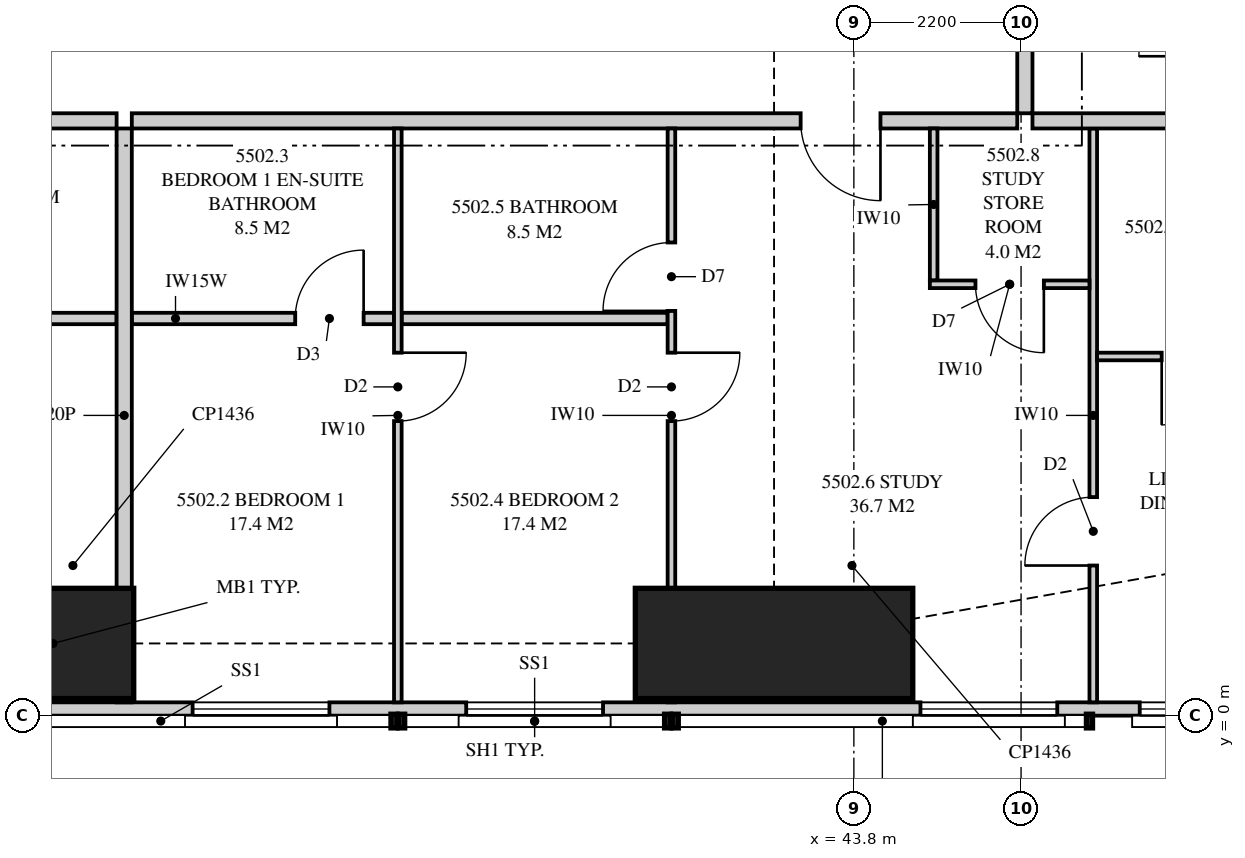
"""IFC4 building model, lengths in metres.
Left out: names, types, materials, properties, quantities, classifications, styles, units other than length and angle.
Written with IfcOpenShell. Run it as: python <this file> out.ifc"""

import sys

from ifc_helpers import new_model, si_unit, direction, frame, frame_2d, origin, origin_2d, place, context, subcontext, project, spatial, polyline, rectangle, outline, extrude, element, fill, save


model = new_model("IFC4")
c1 = context("Model", 3, precision=1e-05, world=origin(), true_north=direction((0.0, 1.0)))
c2 = subcontext(c1, "Body", "Model", "MODEL_VIEW")
j1 = project(units=[si_unit("LENGTHUNIT", "METRE"), si_unit("PLANEANGLEUNIT", "RADIAN")], contexts=[c1])
p1 = place(None, origin())
s1 = spatial("IfcSite", under=j1, at=p1, CompositionType="ELEMENT")
p2 = place(p1, origin())
s2 = spatial("IfcBuilding", under=s1, at=p2, CompositionType="ELEMENT")
p3 = place(p2, frame((0.0, 0.0, 201.25)))
s3 = spatial("IfcBuildingStorey", under=s2, at=p3, CompositionType="ELEMENT", Elevation=201.25)
for number, where, z_axis, x_axis in (
    (1, (32.5, 0.95, 0.0), (0.0, 0.0, 1.0), (0.0, 1.0, 0.0)),
    (2, (42.75, 0.95, 0.0), (0.0, 0.0, 1.0), (0.0, 1.0, 0.0)),
):
    element("IfcColumn", number, at=place(p3, frame(where, z_axis=z_axis, x_axis=x_axis)), inside=s3, PredefinedType="COLUMN", context=c2, shape_type="SweptSolid", body=[
        extrude(rectangle(XDim=1.45, YDim=3.65, at=origin_2d()), origin(), (0.0, 0.0, 1.0), 3.35),
    ])
p4 = place(p3, frame((15.051, 0.087, 0.0), z_axis=(0.0, 0.0, 1.0), x_axis=(1.0, 0.0, 0.0)))
e3 = element("IfcWall", 3, at=p4, inside=s3, PredefinedType="SOLIDWALL", context=c2, shape_type="SweptSolid", body=[
    extrude(outline(polyline([(0.0, 0.0), (34.897, 0.0), (34.897, 3.11), (27.91, 3.11), (27.91, 2.15), (27.836, 2.15), (27.836, 3.11), (27.699, 3.11), (27.699, 2.15), (7.199, 2.15), (7.199, 3.11), (7.062, 3.11), (7.062, 2.15), (6.987, 2.15), (6.987, 3.11), (0.0, 3.11), (0.0, 0.0)])), frame((0.0, 0.087, 0.0), z_axis=(0.0, -1.0, 0.0), x_axis=(1.0, 0.0, 0.0)), (0.0, 0.0, 1.0), 0.175),
])
p5 = place(p4, frame((0.699, 0.0, 0.4)))
e4 = element("IfcOpeningElement", 4, at=p5, cuts=e3, PredefinedType="OPENING", context=c2, shape_type="SweptSolid", body=[
    extrude(rectangle(XDim=1.8, YDim=1.7, at=frame_2d((0.9, 0.85))), frame((0.0, 0.097, 0.0), z_axis=(0.0, -1.0, 0.0), x_axis=(1.0, 0.0, 0.0)), (0.0, 0.0, 1.0), 0.195),
])
p6 = place(p4, frame((9.274, 0.0, 0.4)))
e5 = element("IfcOpeningElement", 5, at=p6, cuts=e3, PredefinedType="OPENING", context=c2, shape_type="SweptSolid", body=[
    extrude(rectangle(XDim=2.4, YDim=1.7, at=frame_2d((1.2, 0.85))), frame((0.0, 0.097, 0.0), z_axis=(0.0, -1.0, 0.0), x_axis=(1.0, 0.0, 0.0)), (0.0, 0.0, 1.0), 0.195),
])
p7 = place(p4, frame((13.561, 0.0, 0.0)))
e6 = element("IfcOpeningElement", 6, at=p7, cuts=e3, PredefinedType="OPENING", context=c2, shape_type="SweptSolid", body=[
    extrude(rectangle(XDim=1.8, YDim=2.1, at=frame_2d((0.9, 1.05))), frame((0.0, 0.097, 0.0), z_axis=(0.0, -1.0, 0.0), x_axis=(1.0, 0.0, 0.0)), (0.0, 0.0, 1.0), 0.195),
])
p8 = place(p4, frame((20.049, 0.0, 0.4)))
e7 = element("IfcOpeningElement", 7, at=p8, cuts=e3, PredefinedType="OPENING", context=c2, shape_type="SweptSolid", body=[
    extrude(rectangle(XDim=1.8, YDim=1.7, at=frame_2d((0.9, 0.85))), frame((0.0, 0.097, 0.0), z_axis=(0.0, -1.0, 0.0), x_axis=(1.0, 0.0, 0.0)), (0.0, 0.0, 1.0), 0.195),
])
p9 = place(p4, frame((23.649, 0.0, 0.4)))
e8 = element("IfcOpeningElement", 8, at=p9, cuts=e3, PredefinedType="OPENING", context=c2, shape_type="SweptSolid", body=[
    extrude(rectangle(XDim=1.8, YDim=1.7, at=frame_2d((0.9, 0.85))), frame((0.0, 0.097, 0.0), z_axis=(0.0, -1.0, 0.0), x_axis=(1.0, 0.0, 0.0)), (0.0, 0.0, 1.0), 0.195),
])
p10 = place(p4, frame((29.625, 0.0, 0.4)))
e9 = element("IfcOpeningElement", 9, at=p10, cuts=e3, PredefinedType="OPENING", context=c2, shape_type="SweptSolid", body=[
    extrude(rectangle(XDim=1.8, YDim=1.7, at=frame_2d((0.9, 0.85))), frame((0.0, 0.097, 0.0), z_axis=(0.0, -1.0, 0.0), x_axis=(1.0, 0.0, 0.0)), (0.0, 0.0, 1.0), 0.195),
])
p11 = place(p4, frame((32.51, 0.0, 0.4)))
e10 = element("IfcOpeningElement", 10, at=p11, cuts=e3, PredefinedType="OPENING", context=c2, shape_type="SweptSolid", body=[
    extrude(rectangle(XDim=1.8, YDim=1.7, at=frame_2d((0.9, 0.85))), frame((0.0, 0.097, 0.0), z_axis=(0.0, -1.0, 0.0), x_axis=(1.0, 0.0, 0.0)), (0.0, 0.0, 1.0), 0.195),
])
p12 = place(p3, frame((34.2, 0.175, 0.0), z_axis=(0.0, 0.0, 1.0), x_axis=(0.0, 1.0, 0.0)))
e11 = element("IfcWall", 11, at=p12, inside=s3, PredefinedType="PARTITIONING", context=c2, shape_type="SweptSolid", body=[
    extrude(outline(polyline([(0.0, 0.0), (7.55, 0.0), (7.55, 3.11), (1.685, 3.11), (1.685, 2.15), (0.0, 2.15), (0.0, 3.11), (0.0, 0.0)])), frame((0.0, 0.1, 0.0), z_axis=(0.0, -1.0, 0.0), x_axis=(1.0, 0.0, 0.0)), (0.0, 0.0, 1.0), 0.2),
])
p13 = place(p3, frame((28.4, 5.225, 0.0), z_axis=(0.0, 0.0, 1.0), x_axis=(1.0, 0.0, 0.0)))
e12 = element("IfcWall", 12, at=p13, inside=s3, PredefinedType="PLUMBINGWALL", context=c2, shape_type="SweptSolid", body=[
    extrude(outline(polyline([(0.0, 0.0), (5.7, 0.0), (5.7, 3.11), (4.412, 3.11), (4.412, 2.541), (3.788, 2.541), (3.788, 3.11), (0.0, 3.11), (0.0, 0.0)])), frame((0.0, 0.075, 0.0), z_axis=(0.0, -1.0, 0.0), x_axis=(1.0, 0.0, 0.0)), (0.0, 0.0, 1.0), 0.15),
])
p14 = place(p13, frame((0.4, 0.0, 0.0)))
e13 = element("IfcOpeningElement", 13, at=p14, cuts=e12, PredefinedType="OPENING", context=c2, shape_type="SweptSolid", body=[
    extrude(rectangle(XDim=0.9, YDim=2.1, at=frame_2d((0.45, 1.05))), frame((0.0, 0.085, 0.0), z_axis=(0.0, -1.0, 0.0), x_axis=(1.0, 0.0, 0.0)), (0.0, 0.0, 1.0), 0.17),
])
p15 = place(p3, frame((34.3, 7.825, 0.0), z_axis=(0.0, 0.0, 1.0), x_axis=(1.0, 0.0, 0.0)))
e14 = element("IfcWall", 14, at=p15, inside=s3, PredefinedType="PARTITIONING", context=c2, shape_type="SweptSolid", body=[
    extrude(outline(polyline([(0.0, 0.0), (11.65, 0.0), (11.65, 3.11), (8.787, 3.11), (8.787, 2.541), (8.113, 2.541), (8.113, 3.11), (0.0, 3.11), (0.0, 0.0)])), frame((0.0, 0.1, 0.0), z_axis=(0.0, -1.0, 0.0), x_axis=(1.0, 0.0, 0.0)), (0.0, 0.0, 1.0), 0.2),
])
p16 = place(p15, frame((8.8, 0.0, 0.0)))
e15 = element("IfcOpeningElement", 15, at=p16, cuts=e14, PredefinedType="OPENING", context=c2, shape_type="SweptSolid", body=[
    extrude(rectangle(XDim=1.05, YDim=2.2, at=frame_2d((0.525, 1.1))), frame((0.0, 0.11, 0.0), z_axis=(0.0, -1.0, 0.0), x_axis=(1.0, 0.0, 0.0)), (0.0, 0.0, 1.0), 0.22),
])
p17 = place(p3, frame((37.8, 0.175, 0.0), z_axis=(0.0, 0.0, 1.0), x_axis=(0.0, 1.0, 0.0)))
e16 = element("IfcWall", 16, at=p17, inside=s3, PredefinedType="PARTITIONING", context=c2, shape_type="SweptSolid", body=[
    extrude(outline(polyline([(0.0, 0.0), (7.55, 0.0), (7.55, 3.11), (1.635, 3.11), (1.635, 2.15), (0.0, 2.15), (0.0, 3.11), (0.0, 0.0)])), frame((0.0, 0.05, 0.0), z_axis=(0.0, -1.0, 0.0), x_axis=(1.0, 0.0, 0.0)), (0.0, 0.0, 1.0), 0.1),
])
p18 = place(p17, frame((3.7, 0.0, 0.0)))
e17 = element("IfcOpeningElement", 17, at=p18, cuts=e16, PredefinedType="OPENING", context=c2, shape_type="SweptSolid", body=[
    extrude(rectangle(XDim=0.9, YDim=2.1, at=frame_2d((0.45, 1.05))), frame((0.0, 0.06, 0.0), z_axis=(0.0, -1.0, 0.0), x_axis=(1.0, 0.0, 0.0)), (0.0, 0.0, 1.0), 0.12),
])
p19 = place(p3, frame((41.4, 0.175, 0.0), z_axis=(0.0, 0.0, 1.0), x_axis=(0.0, 1.0, 0.0)))
e18 = element("IfcWall", 18, at=p19, inside=s3, PredefinedType="PARTITIONING", context=c2, shape_type="SweptSolid", body=[
    extrude(outline(polyline([(0.529, 2.15), (0.0, 2.15), (0.0, 0.0), (0.529, 0.0), (0.529, 0.087), (1.021, 0.087), (1.021, 0.0), (7.55, 0.0), (7.55, 3.11), (1.635, 3.11), (1.635, 2.15), (1.021, 2.15), (1.021, 2.063), (0.529, 2.063), (0.529, 2.15)])), frame((0.0, 0.05, 0.0), z_axis=(0.0, -1.0, 0.0), x_axis=(1.0, 0.0, 0.0)), (0.0, 0.0, 1.0), 0.1),
])
p20 = place(p19, frame((3.7, 0.0, 0.0)))
e19 = element("IfcOpeningElement", 19, at=p20, cuts=e18, PredefinedType="OPENING", context=c2, shape_type="SweptSolid", body=[
    extrude(rectangle(XDim=0.9, YDim=2.1, at=frame_2d((0.45, 1.05))), frame((0.0, 0.06, 0.0), z_axis=(0.0, -1.0, 0.0), x_axis=(1.0, 0.0, 0.0)), (0.0, 0.0, 1.0), 0.12),
])
p21 = place(p19, frame((5.15, 0.0, 0.0)))
e20 = element("IfcOpeningElement", 20, at=p21, cuts=e18, PredefinedType="OPENING", context=c2, shape_type="SweptSolid", body=[
    extrude(rectangle(XDim=0.9, YDim=2.1, at=frame_2d((0.45, 1.05))), frame((0.0, 0.06, 0.0), z_axis=(0.0, -1.0, 0.0), x_axis=(1.0, 0.0, 0.0)), (0.0, 0.0, 1.0), 0.12),
])
p22 = place(p3, frame((34.3, 5.225, 0.0), z_axis=(0.0, 0.0, 1.0), x_axis=(1.0, 0.0, 0.0)))
e21 = element("IfcWall", 21, at=p22, inside=s3, PredefinedType="PLUMBINGWALL", context=c2, shape_type="SweptSolid", body=[
    extrude(rectangle(XDim=3.45, YDim=0.15, at=frame_2d((1.725, 0.0))), origin(), (0.0, 0.0, 1.0), 3.11),
])
p23 = place(p22, frame((2.15, 0.0, 0.0)))
e22 = element("IfcOpeningElement", 22, at=p23, cuts=e21, PredefinedType="OPENING", context=c2, shape_type="SweptSolid", body=[
    extrude(rectangle(XDim=0.9, YDim=2.1, at=frame_2d((0.45, 1.05))), frame((0.0, 0.085, 0.0), z_axis=(0.0, -1.0, 0.0), x_axis=(1.0, 0.0, 0.0)), (0.0, 0.0, 1.0), 0.17),
])
p24 = place(p3, frame((37.85, 5.225, 0.0), z_axis=(0.0, 0.0, 1.0), x_axis=(1.0, 0.0, 0.0)))
e23 = element("IfcWall", 23, at=p24, inside=s3, PredefinedType="PLUMBINGWALL", context=c2, shape_type="SweptSolid", body=[
    extrude(rectangle(XDim=3.5, YDim=0.15, at=frame_2d((1.75, 0.0))), origin(), (0.0, 0.0, 1.0), 3.11),
])
p25 = place(p3, frame((46.95, 0.175, 0.0), z_axis=(0.0, 0.0, 1.0), x_axis=(0.0, 1.0, 0.0)))
e24 = element("IfcWall", 24, at=p25, inside=s3, PredefinedType="PARTITIONING", context=c2, shape_type="SweptSolid", body=[
    extrude(outline(polyline([(0.0, 0.0), (7.55, 0.0), (7.55, 3.11), (2.392, 3.11), (2.392, 2.15), (0.645, 2.15), (0.645, 3.11), (0.0, 3.11), (0.0, 0.0)])), frame((0.0, 0.05, 0.0), z_axis=(0.0, -1.0, 0.0), x_axis=(1.0, 0.0, 0.0)), (0.0, 0.0, 1.0), 0.1),
])
p26 = place(p25, frame((1.8, 0.0, 0.0)))
e25 = element("IfcOpeningElement", 25, at=p26, cuts=e24, PredefinedType="OPENING", context=c2, shape_type="SweptSolid", body=[
    extrude(rectangle(XDim=0.9, YDim=2.1, at=frame_2d((0.45, 1.05))), frame((0.0, 0.06, 0.0), z_axis=(0.0, -1.0, 0.0), x_axis=(1.0, 0.0, 0.0)), (0.0, 0.0, 1.0), 0.12),
])
p27 = place(p3, frame((47.0, 4.725, 0.0), z_axis=(0.0, 0.0, 1.0), x_axis=(1.0, 0.0, 0.0)))
e26 = element("IfcWall", 26, at=p27, inside=s3, PredefinedType="PARTITIONING", context=c2, shape_type="SweptSolid", body=[
    extrude(rectangle(XDim=2.6, YDim=0.1, at=frame_2d((1.3, 0.0))), origin(), (0.0, 0.0, 1.0), 3.11),
])
p28 = place(p27, frame((0.85, 0.0, 0.0)))
e27 = element("IfcOpeningElement", 27, at=p28, cuts=e26, PredefinedType="OPENING", context=c2, shape_type="SweptSolid", body=[
    extrude(rectangle(XDim=0.9, YDim=2.1, at=frame_2d((0.45, 1.05))), frame((0.0, 0.06, 0.0), z_axis=(0.0, -1.0, 0.0), x_axis=(1.0, 0.0, 0.0)), (0.0, 0.0, 1.0), 0.12),
])
p29 = place(p3, frame((46.15, 7.825, 0.0), z_axis=(0.0, 0.0, 1.0), x_axis=(1.0, 0.0, 0.0)))
e28 = element("IfcWall", 28, at=p29, inside=s3, PredefinedType="PARTITIONING", context=c2, shape_type="SweptSolid", body=[
    extrude(outline(polyline([(0.0, 0.0), (6.85, 0.0), (6.85, 3.11), (6.138, 3.11), (6.138, 2.15), (4.303, 2.15), (4.303, 3.11), (0.0, 3.11), (0.0, 0.0)])), frame((0.0, 0.1, 0.0), z_axis=(0.0, -1.0, 0.0), x_axis=(1.0, 0.0, 0.0)), (0.0, 0.0, 1.0), 0.2),
])
p30 = place(p3, frame((46.05, 7.925, 0.0), z_axis=(0.0, 0.0, 1.0), x_axis=(0.0, 1.0, 0.0)))
e29 = element("IfcWall", 29, at=p30, inside=s3, PredefinedType="PARTITIONING", context=c2, shape_type="SweptSolid", body=[
    extrude(outline(polyline([(0.0, 0.0), (5.875, 0.0), (5.875, 3.11), (5.412, 3.11), (5.412, 2.541), (4.738, 2.541), (4.738, 3.11), (0.0, 3.11), (0.0, 0.0)])), frame((0.0, 0.1, 0.0), z_axis=(0.0, -1.0, 0.0), x_axis=(1.0, 0.0, 0.0)), (0.0, 0.0, 1.0), 0.2),
])
p31 = place(p30, frame((2.438, 0.0, 0.0)))
e30 = element("IfcOpeningElement", 30, at=p31, cuts=e29, PredefinedType="OPENING", context=c2, shape_type="SweptSolid", body=[
    extrude(rectangle(XDim=1.05, YDim=2.2, at=frame_2d((0.525, 1.1))), frame((0.0, 0.11, 0.0), z_axis=(0.0, -1.0, 0.0), x_axis=(1.0, 0.0, 0.0)), (0.0, 0.0, 1.0), 0.22),
])
p32 = place(p3, frame((24.5, 7.825, 0.0), z_axis=(0.0, 0.0, 1.0), x_axis=(1.0, 0.0, 0.0)))
e31 = element("IfcWall", 31, at=p32, inside=s3, PredefinedType="PARTITIONING", context=c2, shape_type="SweptSolid", body=[
    extrude(outline(polyline([(0.0, 0.0), (9.6, 0.0), (9.6, 3.11), (8.337, 3.11), (8.337, 2.541), (7.663, 2.541), (7.663, 3.11), (0.0, 3.11), (0.0, 0.0)])), frame((0.0, 0.1, 0.0), z_axis=(0.0, -1.0, 0.0), x_axis=(1.0, 0.0, 0.0)), (0.0, 0.0, 1.0), 0.2),
])
p33 = place(p3, frame((46.9, 5.675, 0.0), z_axis=(0.0, 0.0, 1.0), x_axis=(-1.0, 0.0, 0.0)))
e32 = element("IfcWall", 32, at=p33, inside=s3, PredefinedType="PARTITIONING", context=c2, shape_type="SweptSolid", body=[
    extrude(rectangle(XDim=2.1, YDim=0.1, at=frame_2d((1.05, 0.0))), origin(), (0.0, 0.0, 1.0), 3.11),
])
p34 = place(p33, frame((0.6, 0.0, 0.0)))
e33 = element("IfcOpeningElement", 33, at=p34, cuts=e32, PredefinedType="OPENING", context=c2, shape_type="SweptSolid", body=[
    extrude(rectangle(XDim=0.9, YDim=2.1, at=frame_2d((0.45, 1.05))), frame((0.0, 0.06, 0.0), z_axis=(0.0, -1.0, 0.0), x_axis=(1.0, 0.0, 0.0)), (0.0, 0.0, 1.0), 0.12),
])
p35 = place(p3, frame((44.85, 7.725, 0.0), z_axis=(0.0, 0.0, 1.0), x_axis=(0.0, -1.0, 0.0)))
e34 = element("IfcWall", 34, at=p35, inside=s3, PredefinedType="PARTITIONING", context=c2, shape_type="SweptSolid", body=[
    extrude(rectangle(XDim=2.0, YDim=0.1, at=frame_2d((1.0, 0.0))), origin(), (0.0, 0.0, 1.0), 3.11),
])
p36 = place(p8, origin())
e35 = element("IfcWindow", 35, at=p36, inside=s3, PartitioningType="SINGLE_PANEL", PredefinedType="WINDOW", context=c2, shape_type="SweptSolid", body=[
    extrude(rectangle(XDim=1.8, YDim=1.7, at=frame_2d((0.9, 0.85))), frame((0.0, 0.03, 0.0), z_axis=(0.0, -1.0, 0.0), x_axis=(1.0, 0.0, 0.0)), (0.0, 0.0, 1.0), 0.06),
])
fill(e7, e35)
p37 = place(p9, origin())
e36 = element("IfcWindow", 36, at=p37, inside=s3, PartitioningType="SINGLE_PANEL", PredefinedType="WINDOW", context=c2, shape_type="SweptSolid", body=[
    extrude(rectangle(XDim=1.8, YDim=1.7, at=frame_2d((0.9, 0.85))), frame((0.0, 0.03, 0.0), z_axis=(0.0, -1.0, 0.0), x_axis=(1.0, 0.0, 0.0)), (0.0, 0.0, 1.0), 0.06),
])
fill(e8, e36)
p38 = place(p10, origin())
e37 = element("IfcWindow", 37, at=p38, inside=s3, PartitioningType="SINGLE_PANEL", PredefinedType="WINDOW", context=c2, shape_type="SweptSolid", body=[
    extrude(rectangle(XDim=1.8, YDim=1.7, at=frame_2d((0.9, 0.85))), frame((0.0, 0.03, 0.0), z_axis=(0.0, -1.0, 0.0), x_axis=(1.0, 0.0, 0.0)), (0.0, 0.0, 1.0), 0.06),
])
fill(e9, e37)
p39 = place(p11, origin())
e38 = element("IfcWindow", 38, at=p39, inside=s3, PartitioningType="SINGLE_PANEL", PredefinedType="WINDOW", context=c2, shape_type="SweptSolid", body=[
    extrude(rectangle(XDim=1.8, YDim=1.7, at=frame_2d((0.9, 0.85))), frame((0.0, 0.03, 0.0), z_axis=(0.0, -1.0, 0.0), x_axis=(1.0, 0.0, 0.0)), (0.0, 0.0, 1.0), 0.06),
])
fill(e10, e38)
p40 = place(p16, frame((1.05, 0.0, 0.0), z_axis=(0.0, 0.0, 1.0), x_axis=(-1.0, 0.0, 0.0)))
e39 = element("IfcDoor", 39, at=p40, inside=s3, OperationType="SINGLE_SWING_LEFT", PredefinedType="DOOR", context=c2, shape_type="SweptSolid", body=[
    extrude(rectangle(XDim=1.05, YDim=2.2, at=frame_2d((0.525, 1.1))), frame((0.0, 0.025, 0.0), z_axis=(0.0, -1.0, 0.0), x_axis=(1.0, 0.0, 0.0)), (0.0, 0.0, 1.0), 0.05),
])
fill(e15, e39)
p41 = place(p18, frame((0.9, 0.0, 0.0), z_axis=(0.0, 0.0, 1.0), x_axis=(-1.0, 0.0, 0.0)))
e40 = element("IfcDoor", 40, at=p41, inside=s3, OperationType="SINGLE_SWING_LEFT", PredefinedType="DOOR", context=c2, shape_type="SweptSolid", body=[
    extrude(rectangle(XDim=0.9, YDim=2.1, at=frame_2d((0.45, 1.05))), frame((0.0, 0.025, 0.0), z_axis=(0.0, -1.0, 0.0), x_axis=(1.0, 0.0, 0.0)), (0.0, 0.0, 1.0), 0.05),
])
fill(e17, e40)
p42 = place(p23, origin())
e41 = element("IfcDoor", 41, at=p42, inside=s3, OperationType="SINGLE_SWING_RIGHT", PredefinedType="DOOR", context=c2, shape_type="SweptSolid", body=[
    extrude(rectangle(XDim=0.9, YDim=2.1, at=frame_2d((0.45, 1.05))), frame((0.0, 0.025, 0.0), z_axis=(0.0, -1.0, 0.0), x_axis=(1.0, 0.0, 0.0)), (0.0, 0.0, 1.0), 0.05),
])
fill(e22, e41)
p43 = place(p20, frame((0.9, 0.0, 0.0), z_axis=(0.0, 0.0, 1.0), x_axis=(-1.0, 0.0, 0.0)))
e42 = element("IfcDoor", 42, at=p43, inside=s3, OperationType="SINGLE_SWING_LEFT", PredefinedType="DOOR", context=c2, shape_type="SweptSolid", body=[
    extrude(rectangle(XDim=0.9, YDim=2.1, at=frame_2d((0.45, 1.05))), frame((0.0, 0.025, 0.0), z_axis=(0.0, -1.0, 0.0), x_axis=(1.0, 0.0, 0.0)), (0.0, 0.0, 1.0), 0.05),
])
fill(e19, e42)
p44 = place(p21, origin())
e43 = element("IfcDoor", 43, at=p44, inside=s3, OperationType="SINGLE_SWING_LEFT", PredefinedType="DOOR", context=c2, shape_type="SweptSolid", body=[
    extrude(rectangle(XDim=0.9, YDim=2.1, at=frame_2d((0.45, 1.05))), frame((0.0, 0.025, 0.0), z_axis=(0.0, -1.0, 0.0), x_axis=(1.0, 0.0, 0.0)), (0.0, 0.0, 1.0), 0.05),
])
fill(e20, e43)
p45 = place(p26, origin())
e44 = element("IfcDoor", 44, at=p45, inside=s3, OperationType="SINGLE_SWING_LEFT", PredefinedType="DOOR", context=c2, shape_type="SweptSolid", body=[
    extrude(rectangle(XDim=0.9, YDim=2.1, at=frame_2d((0.45, 1.05))), frame((0.0, 0.025, 0.0), z_axis=(0.0, -1.0, 0.0), x_axis=(1.0, 0.0, 0.0)), (0.0, 0.0, 1.0), 0.05),
])
fill(e25, e44)
p46 = place(p28, frame((0.9, 0.0, 0.0), z_axis=(0.0, 0.0, 1.0), x_axis=(-1.0, 0.0, 0.0)))
e45 = element("IfcDoor", 45, at=p46, inside=s3, OperationType="SINGLE_SWING_RIGHT", PredefinedType="DOOR", context=c2, shape_type="SweptSolid", body=[
    extrude(rectangle(XDim=0.9, YDim=2.1, at=frame_2d((0.45, 1.05))), frame((0.0, 0.025, 0.0), z_axis=(0.0, -1.0, 0.0), x_axis=(1.0, 0.0, 0.0)), (0.0, 0.0, 1.0), 0.05),
])
fill(e27, e45)
p47 = place(p34, origin())
e46 = element("IfcDoor", 46, at=p47, inside=s3, OperationType="SINGLE_SWING_LEFT", PredefinedType="DOOR", context=c2, shape_type="SweptSolid", body=[
    extrude(rectangle(XDim=0.9, YDim=2.1, at=frame_2d((0.45, 1.05))), frame((0.0, 0.025, 0.0), z_axis=(0.0, -1.0, 0.0), x_axis=(1.0, 0.0, 0.0)), (0.0, 0.0, 1.0), 0.05),
])
fill(e33, e46)
save(model, sys.argv[1])
